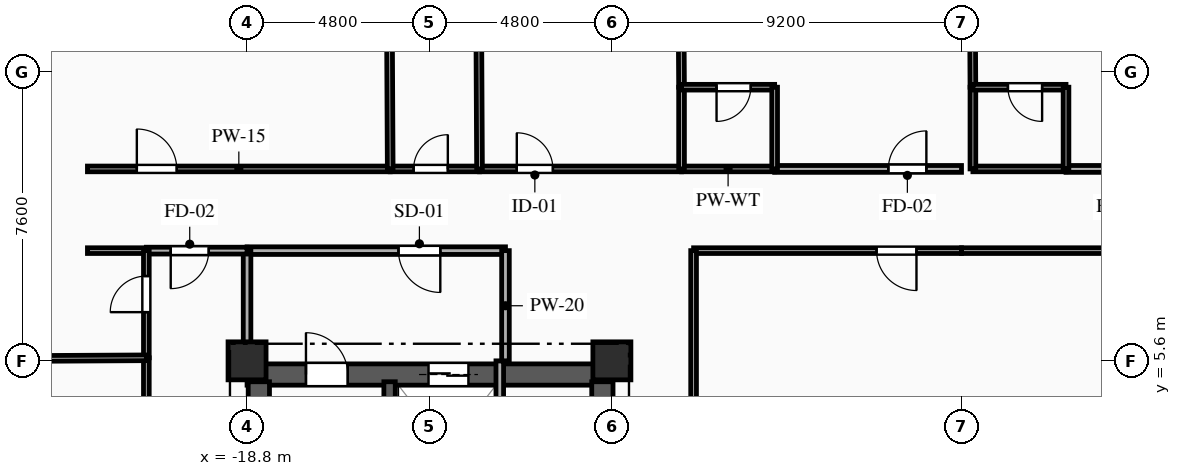
"""IFC4 building model, lengths in metres.
Left out: names, types, materials, properties, quantities, classifications, styles, units other than length and angle.
Written with IfcOpenShell. Run it as: python <this file> out.ifc"""

import sys

from ifc_helpers import new_model, si_unit, direction, frame, frame_2d, origin, origin_2d, place, context, subcontext, project, spatial, rectangle, extrude, element, fill, save


model = new_model("IFC4")
c1 = context("Model", 3, precision=1e-05, world=origin(), true_north=direction((0.0, 1.0)))
c2 = subcontext(c1, "Body", "Model", "MODEL_VIEW")
j1 = project(units=[si_unit("LENGTHUNIT", "METRE"), si_unit("PLANEANGLEUNIT", "RADIAN")], contexts=[c1])
p1 = place(None, origin())
s1 = spatial("IfcSite", under=j1, at=p1, CompositionType="ELEMENT")
p2 = place(p1, origin())
s2 = spatial("IfcBuilding", under=s1, at=p2, CompositionType="ELEMENT")
p3 = place(p2, frame((0.0, 0.0, 99.1)))
s3 = spatial("IfcBuildingStorey", under=s2, at=p3, CompositionType="ELEMENT", Elevation=99.1)
for number, where, z_axis, x_axis in (
    (1, (-18.8, 5.6, 0.0), (0.0, 0.0, 1.0), (1.0, 0.0, 0.0)),
    (2, (-9.2, 5.6, 0.0), (0.0, 0.0, 1.0), (1.0, 0.0, 0.0)),
):
    element("IfcColumn", number, at=place(p3, frame(where, z_axis=z_axis, x_axis=x_axis)), inside=s3, PredefinedType="COLUMN", context=c2, shape_type="SweptSolid", body=[
        extrude(rectangle(XDim=1.0, YDim=1.0, at=origin_2d()), origin(), (0.0, 0.0, 1.0), 3.35),
    ])
p4 = place(p3, frame((-18.8, 5.24, 0.0), z_axis=(0.0, 0.0, 1.0), x_axis=(1.0, 0.0, 0.0)))
e3 = element("IfcWall", 3, at=p4, inside=s3, PredefinedType="SHEAR", context=c2, shape_type="SweptSolid", body=[
    extrude(rectangle(XDim=9.6, YDim=0.56, at=frame_2d((4.8, 0.0))), origin(), (0.0, 0.0, 1.0), 3.045),
])
p5 = place(p4, frame((1.55, 0.0, 0.0)))
e4 = element("IfcOpeningElement", 4, at=p5, cuts=e3, PredefinedType="OPENING", context=c2, shape_type="SweptSolid", body=[
    extrude(rectangle(XDim=1.1, YDim=2.15, at=frame_2d((0.55, 1.075))), frame((0.0, 0.29, 0.0), z_axis=(0.0, -1.0, 0.0), x_axis=(1.0, 0.0, 0.0)), (0.0, 0.0, 1.0), 0.58),
])
p6 = place(p4, frame((4.775, 0.0, 0.0)))
e5 = element("IfcOpeningElement", 5, at=p6, cuts=e3, PredefinedType="OPENING", context=c2, shape_type="SweptSolid", body=[
    extrude(rectangle(XDim=1.05, YDim=2.1, at=frame_2d((0.525, 1.05))), frame((0.0, 0.29, 0.0), z_axis=(0.0, -1.0, 0.0), x_axis=(1.0, 0.0, 0.0)), (0.0, 0.0, 1.0), 0.58),
])
p7 = place(p3, frame((-18.49, -5.05, 0.0), z_axis=(0.0, 0.0, 1.0), x_axis=(0.0, 1.0, 0.0)))
e6 = element("IfcWall", 6, at=p7, inside=s3, PredefinedType="SHEAR", context=c2, shape_type="SweptSolid", body=[
    extrude(rectangle(XDim=10.1, YDim=0.56, at=frame_2d((5.05, 0.0))), origin(), (0.0, 0.0, 1.0), 3.045),
])
p8 = place(p3, frame((-9.45, -5.05, 0.0), z_axis=(0.0, 0.0, 1.0), x_axis=(0.0, 1.0, 0.0)))
e7 = element("IfcWall", 7, at=p8, inside=s3, PredefinedType="SHEAR", context=c2, shape_type="SweptSolid", body=[
    extrude(rectangle(XDim=10.1, YDim=0.56, at=frame_2d((5.05, 0.0))), origin(), (0.0, 0.0, 1.0), 3.045),
])
p9 = place(p8, frame((7.15, 0.0, 0.0)))
e8 = element("IfcOpeningElement", 8, at=p9, cuts=e7, PredefinedType="OPENING", context=c2, shape_type="SweptSolid", body=[
    extrude(rectangle(XDim=0.9, YDim=2.1, at=frame_2d((0.45, 1.05))), frame((0.0, 0.29, 0.0), z_axis=(0.0, -1.0, 0.0), x_axis=(1.0, 0.0, 0.0)), (0.0, 0.0, 1.0), 0.58),
])
p10 = place(p8, frame((2.4, 0.0, 0.0)))
e9 = element("IfcOpeningElement", 9, at=p10, cuts=e7, PredefinedType="OPENING", context=c2, shape_type="SweptSolid", body=[
    extrude(rectangle(XDim=1.2, YDim=2.15, at=frame_2d((0.6, 1.075))), frame((0.0, 0.29, 0.0), z_axis=(0.0, -1.0, 0.0), x_axis=(1.0, 0.0, 0.0)), (0.0, 0.0, 1.0), 0.58),
])
p11 = place(p3, frame((-15.05, -5.05, 0.0), z_axis=(0.0, 0.0, 1.0), x_axis=(0.0, 1.0, 0.0)))
e10 = element("IfcWall", 10, at=p11, inside=s3, PredefinedType="SHEAR", context=c2, shape_type="SweptSolid", body=[
    extrude(rectangle(XDim=10.1, YDim=0.3, at=frame_2d((5.05, 0.0))), origin(), (0.0, 0.0, 1.0), 3.045),
])
p12 = place(p3, frame((-12.15, 1.55, 0.0), z_axis=(0.0, 0.0, 1.0), x_axis=(0.0, 1.0, 0.0)))
e11 = element("IfcWall", 11, at=p12, inside=s3, PredefinedType="PARTITIONING", context=c2, shape_type="SweptSolid", body=[
    extrude(rectangle(XDim=4.05, YDim=0.2, at=frame_2d((2.025, 0.0))), origin(), (0.0, 0.0, 1.0), 3.045),
])
p13 = place(p3, frame((-12.0, 8.5, 0.0), z_axis=(0.0, 0.0, 1.0), x_axis=(-1.0, 0.0, 0.0)))
e12 = element("IfcWall", 12, at=p13, inside=s3, PredefinedType="PARTITIONING", context=c2, shape_type="SweptSolid", body=[
    extrude(rectangle(XDim=6.8, YDim=0.2, at=frame_2d((3.4, 0.0))), origin(), (0.0, 0.0, 1.0), 3.045),
])
p14 = place(p13, frame((1.715, 0.0, 0.0)))
e13 = element("IfcOpeningElement", 13, at=p14, cuts=e12, PredefinedType="OPENING", context=c2, shape_type="SweptSolid", body=[
    extrude(rectangle(XDim=1.1, YDim=2.15, at=frame_2d((0.55, 1.075))), frame((0.0, 0.11, 0.0), z_axis=(0.0, -1.0, 0.0), x_axis=(1.0, 0.0, 0.0)), (0.0, 0.0, 1.0), 0.22),
])
p15 = place(p3, frame((-12.0, 5.6, 0.0), z_axis=(0.0, 0.0, 1.0), x_axis=(0.0, 1.0, 0.0)))
e14 = element("IfcWall", 14, at=p15, inside=s3, PredefinedType="PARTITIONING", context=c2, shape_type="SweptSolid", body=[
    extrude(rectangle(XDim=2.9, YDim=0.2, at=frame_2d((1.45, 0.0))), origin(), (0.0, 0.0, 1.0), 3.045),
])
p16 = place(p3, frame((-18.8, 8.5, 0.0), z_axis=(0.0, 0.0, 1.0), x_axis=(0.0, -1.0, 0.0)))
e15 = element("IfcWall", 15, at=p16, inside=s3, PredefinedType="PARTITIONING", context=c2, shape_type="SweptSolid", body=[
    extrude(rectangle(XDim=2.9, YDim=0.2, at=frame_2d((1.45, 0.0))), origin(), (0.0, 0.0, 1.0), 2.53),
])
p17 = place(p3, frame((-18.8, 8.5, 0.0), z_axis=(0.0, 0.0, 1.0), x_axis=(-1.0, 0.0, 0.0)))
e16 = element("IfcWall", 16, at=p17, inside=s3, PredefinedType="PARTITIONING", context=c2, shape_type="SweptSolid", body=[
    extrude(rectangle(XDim=2.65, YDim=0.18, at=frame_2d((1.325, 0.0))), origin(), (0.0, 0.0, 1.0), 3.045),
])
p18 = place(p17, frame((1.009, 0.0, 0.0)))
e17 = element("IfcOpeningElement", 17, at=p18, cuts=e16, PredefinedType="OPENING", context=c2, shape_type="SweptSolid", body=[
    extrude(rectangle(XDim=1.0, YDim=2.15, at=frame_2d((0.5, 1.075))), frame((0.0, 0.1, 0.0), z_axis=(0.0, -1.0, 0.0), x_axis=(1.0, 0.0, 0.0)), (0.0, 0.0, 1.0), 0.2),
])
p19 = place(p3, frame((-21.45, 8.5, 0.0), z_axis=(0.0, 0.0, 1.0), x_axis=(-1.0, 0.0, 0.0)))
e18 = element("IfcWall", 18, at=p19, inside=s3, PredefinedType="PARTITIONING", context=c2, shape_type="SweptSolid", body=[
    extrude(rectangle(XDim=1.55, YDim=0.15, at=frame_2d((0.775, 0.0))), origin(), (0.0, 0.0, 1.0), 3.045),
])
p20 = place(p3, frame((-23.0, 10.65, 0.0), z_axis=(0.0, 0.0, 1.0), x_axis=(1.0, 0.0, 0.0)))
e19 = element("IfcWall", 19, at=p20, inside=s3, PredefinedType="PARTITIONING", context=c2, shape_type="SweptSolid", body=[
    extrude(rectangle(XDim=7.967, YDim=0.15, at=frame_2d((3.983, 0.0))), origin(), (0.0, 0.0, 1.0), 3.045),
])
p21 = place(p20, frame((1.3, 0.0, 0.0)))
e20 = element("IfcOpeningElement", 20, at=p21, cuts=e19, PredefinedType="OPENING", context=c2, shape_type="SweptSolid", body=[
    extrude(rectangle(XDim=1.05, YDim=2.15, at=frame_2d((0.525, 1.075))), frame((0.0, 0.085, 0.0), z_axis=(0.0, -1.0, 0.0), x_axis=(1.0, 0.0, 0.0)), (0.0, 0.0, 1.0), 0.17),
])
p22 = place(p3, frame((-15.033, 10.65, 0.0), z_axis=(0.0, 0.0, 1.0), x_axis=(1.0, 0.0, 0.0)))
e21 = element("IfcWall", 21, at=p22, inside=s3, PredefinedType="PLUMBINGWALL", context=c2, shape_type="SweptSolid", body=[
    extrude(rectangle(XDim=2.35, YDim=0.15, at=frame_2d((1.175, 0.0))), origin(), (0.0, 0.0, 1.0), 3.045),
])
p23 = place(p22, frame((0.616, 0.0, 0.0)))
e22 = element("IfcOpeningElement", 22, at=p23, cuts=e21, PredefinedType="OPENING", context=c2, shape_type="SweptSolid", body=[
    extrude(rectangle(XDim=0.9, YDim=2.1, at=frame_2d((0.45, 1.05))), frame((0.0, 0.085, 0.0), z_axis=(0.0, -1.0, 0.0), x_axis=(1.0, 0.0, 0.0)), (0.0, 0.0, 1.0), 0.17),
])
p24 = place(p3, frame((-12.683, 10.65, 0.0), z_axis=(0.0, 0.0, 1.0), x_axis=(1.0, 0.0, 0.0)))
e23 = element("IfcWall", 23, at=p24, inside=s3, PredefinedType="PARTITIONING", context=c2, shape_type="SweptSolid", body=[
    extrude(rectangle(XDim=5.316, YDim=0.15, at=frame_2d((2.658, 0.0))), origin(), (0.0, 0.0, 1.0), 3.045),
])
p25 = place(p24, frame((0.981, 0.0, 0.0)))
e24 = element("IfcOpeningElement", 24, at=p25, cuts=e23, PredefinedType="OPENING", context=c2, shape_type="SweptSolid", body=[
    extrude(rectangle(XDim=0.95, YDim=2.1, at=frame_2d((0.475, 1.05))), frame((0.0, 0.085, 0.0), z_axis=(0.0, -1.0, 0.0), x_axis=(1.0, 0.0, 0.0)), (0.0, 0.0, 1.0), 0.17),
])
p26 = place(p3, frame((-4.917, 10.65, 0.0), z_axis=(0.0, 0.0, 1.0), x_axis=(1.0, 0.0, 0.0)))
e25 = element("IfcWall", 25, at=p26, inside=s3, PredefinedType="PARTITIONING", context=c2, shape_type="SweptSolid", body=[
    extrude(rectangle(XDim=4.917, YDim=0.18, at=frame_2d((2.458, 0.0))), origin(), (0.0, 0.0, 1.0), 3.045),
])
p27 = place(p26, frame((2.992, 0.0, 0.0)))
e26 = element("IfcOpeningElement", 26, at=p27, cuts=e25, PredefinedType="OPENING", context=c2, shape_type="SweptSolid", body=[
    extrude(rectangle(XDim=1.0, YDim=2.15, at=frame_2d((0.5, 1.075))), frame((0.0, 0.1, 0.0), z_axis=(0.0, -1.0, 0.0), x_axis=(1.0, 0.0, 0.0)), (0.0, 0.0, 1.0), 0.2),
])
p28 = place(p3, frame((-7.367, 10.65, 0.0), z_axis=(0.0, 0.0, 1.0), x_axis=(1.0, 0.0, 0.0)))
e27 = element("IfcWall", 27, at=p28, inside=s3, PredefinedType="PLUMBINGWALL", context=c2, shape_type="SweptSolid", body=[
    extrude(rectangle(XDim=2.45, YDim=0.15, at=frame_2d((1.225, 0.0))), origin(), (0.0, 0.0, 1.0), 3.045),
])
p29 = place(p3, frame((0.0, 8.5, 0.0), z_axis=(0.0, 0.0, 1.0), x_axis=(-1.0, 0.0, 0.0)))
e28 = element("IfcWall", 28, at=p29, inside=s3, PredefinedType="PARTITIONING", context=c2, shape_type="SweptSolid", body=[
    extrude(rectangle(XDim=7.05, YDim=0.15, at=frame_2d((3.525, 0.0))), origin(), (0.0, 0.0, 1.0), 3.045),
])
p30 = place(p29, frame((1.185, 0.0, 0.0)))
e29 = element("IfcOpeningElement", 29, at=p30, cuts=e28, PredefinedType="OPENING", context=c2, shape_type="SweptSolid", body=[
    extrude(rectangle(XDim=1.05, YDim=2.15, at=frame_2d((0.525, 1.075))), frame((0.0, 0.085, 0.0), z_axis=(0.0, -1.0, 0.0), x_axis=(1.0, 0.0, 0.0)), (0.0, 0.0, 1.0), 0.17),
])
p31 = place(p3, frame((2.75, 10.65, 0.0), z_axis=(0.0, 0.0, 1.0), x_axis=(1.0, 0.0, 0.0)))
e30 = element("IfcWall", 30, at=p31, inside=s3, PredefinedType="PARTITIONING", context=c2, shape_type="SweptSolid", body=[
    extrude(rectangle(XDim=5.217, YDim=0.18, at=frame_2d((2.608, 0.0))), origin(), (0.0, 0.0, 1.0), 3.045),
])
p32 = place(p31, frame((0.962, 0.0, 0.0)))
e31 = element("IfcOpeningElement", 31, at=p32, cuts=e30, PredefinedType="OPENING", context=c2, shape_type="SweptSolid", body=[
    extrude(rectangle(XDim=1.0, YDim=2.15, at=frame_2d((0.5, 1.075))), frame((0.0, 0.1, 0.0), z_axis=(0.0, -1.0, 0.0), x_axis=(1.0, 0.0, 0.0)), (0.0, 0.0, 1.0), 0.2),
])
p33 = place(p3, frame((0.3, 10.65, 0.0), z_axis=(0.0, 0.0, 1.0), x_axis=(1.0, 0.0, 0.0)))
e32 = element("IfcWall", 32, at=p33, inside=s3, PredefinedType="PLUMBINGWALL", context=c2, shape_type="SweptSolid", body=[
    extrude(rectangle(XDim=2.45, YDim=0.15, at=frame_2d((1.225, 0.0))), origin(), (0.0, 0.0, 1.0), 3.045),
])
for number, where, z_axis, x_axis in (
    (33, (7.05, 8.5, 0.0), (0.0, 0.0, 1.0), (-1.0, 0.0, 0.0)),
    (34, (-7.05, 8.5, 0.0), (0.0, 0.0, 1.0), (0.0, -1.0, 0.0)),
):
    element("IfcWall", number, at=place(p3, frame(where, z_axis=z_axis, x_axis=x_axis)), inside=s3, PredefinedType="PARTITIONING", context=c2, shape_type="SweptSolid", body=[
        extrude(rectangle(XDim=7.05, YDim=0.15, at=frame_2d((3.525, 0.0))), origin(), (0.0, 0.0, 1.0), 3.045),
    ])
p34 = place(p3, frame((-21.45, 2.86, 0.0), z_axis=(0.0, 0.0, 1.0), x_axis=(0.0, 1.0, 0.0)))
e35 = element("IfcWall", 35, at=p34, inside=s3, PredefinedType="PARTITIONING", context=c2, shape_type="SweptSolid", body=[
    extrude(rectangle(XDim=2.82, YDim=0.15, at=frame_2d((1.41, 0.0))), origin(), (0.0, 0.0, 1.0), 3.045),
])
p35 = place(p34, frame((0.669, 0.0, 0.0)))
e36 = element("IfcOpeningElement", 36, at=p35, cuts=e35, PredefinedType="OPENING", context=c2, shape_type="SweptSolid", body=[
    extrude(rectangle(XDim=0.95, YDim=2.1, at=frame_2d((0.475, 1.05))), frame((0.0, 0.085, 0.0), z_axis=(0.0, -1.0, 0.0), x_axis=(1.0, 0.0, 0.0)), (0.0, 0.0, 1.0), 0.17),
])
p36 = place(p3, frame((-21.45, 5.68, 0.0), z_axis=(0.0, 0.0, 1.0), x_axis=(0.0, 1.0, 0.0)))
e37 = element("IfcWall", 37, at=p36, inside=s3, PredefinedType="PARTITIONING", context=c2, shape_type="SweptSolid", body=[
    extrude(rectangle(XDim=2.82, YDim=0.15, at=frame_2d((1.41, 0.0))), origin(), (0.0, 0.0, 1.0), 3.045),
])
p37 = place(p36, frame((1.201, 0.0, 0.0)))
e38 = element("IfcOpeningElement", 38, at=p37, cuts=e37, PredefinedType="OPENING", context=c2, shape_type="SweptSolid", body=[
    extrude(rectangle(XDim=0.95, YDim=2.1, at=frame_2d((0.475, 1.05))), frame((0.0, 0.085, 0.0), z_axis=(0.0, -1.0, 0.0), x_axis=(1.0, 0.0, 0.0)), (0.0, 0.0, 1.0), 0.17),
])
p38 = place(p3, frame((-29.27, 5.636, 0.0), z_axis=(0.0, 0.0, 1.0), x_axis=(0.999984210669, 0.005619467326, 0.0)))
e39 = element("IfcWall", 39, at=p38, inside=s3, PredefinedType="PARTITIONING", context=c2, shape_type="SweptSolid", body=[
    extrude(rectangle(XDim=7.82, YDim=0.15, at=frame_2d((3.91, 0.0))), origin(), (0.0, 0.0, 1.0), 3.045),
])
p39 = place(p3, frame((-15.077, 18.85, 0.0), z_axis=(0.0, 0.0, 1.0), x_axis=(0.005358979853, -0.999985640564, 0.0)))
e40 = element("IfcWall", 40, at=p39, inside=s3, PredefinedType="PLUMBINGWALL", context=c2, shape_type="SweptSolid", body=[
    extrude(rectangle(XDim=8.2, YDim=0.15, at=frame_2d((4.1, 0.0))), origin(), (0.0, 0.0, 1.0), 3.045),
])
p40 = place(p3, frame((-12.727, 19.097, 0.0), z_axis=(0.0, 0.0, 1.0), x_axis=(0.005173341175, -0.999986618181, 0.0)))
e41 = element("IfcWall", 41, at=p40, inside=s3, PredefinedType="PLUMBINGWALL", context=c2, shape_type="SweptSolid", body=[
    extrude(rectangle(XDim=8.447, YDim=0.15, at=frame_2d((4.224, 0.0))), origin(), (0.0, 0.0, 1.0), 3.045),
])
p41 = place(p3, frame((-7.411, 19.656, 0.0), z_axis=(0.0, 0.0, 1.0), x_axis=(0.006409668201, -0.999979457866, 0.0)))
e42 = element("IfcWall", 42, at=p41, inside=s3, PredefinedType="PARTITIONING", context=c2, shape_type="SweptSolid", body=[
    extrude(rectangle(XDim=6.856, YDim=0.15, at=frame_2d((3.428, 0.0))), origin(), (0.0, 0.0, 1.0), 3.045),
])
p42 = place(p3, frame((-7.367, 12.8, 0.0), z_axis=(0.0, 0.0, 1.0), x_axis=(0.0, -1.0, 0.0)))
e43 = element("IfcWall", 43, at=p42, inside=s3, PredefinedType="PLUMBINGWALL", context=c2, shape_type="SweptSolid", body=[
    extrude(rectangle(XDim=2.15, YDim=0.15, at=frame_2d((1.075, 0.0))), origin(), (0.0, 0.0, 1.0), 3.045),
])
p43 = place(p3, frame((-4.917, 12.8, 0.0), z_axis=(0.0, 0.0, 1.0), x_axis=(-1.0, 0.0, 0.0)))
e44 = element("IfcWall", 44, at=p43, inside=s3, PredefinedType="PLUMBINGWALL", context=c2, shape_type="SweptSolid", body=[
    extrude(rectangle(XDim=2.45, YDim=0.15, at=frame_2d((1.225, 0.0))), origin(), (0.0, 0.0, 1.0), 3.045),
])
p44 = place(p43, frame((0.629, 0.0, 0.0)))
e45 = element("IfcOpeningElement", 45, at=p44, cuts=e44, PredefinedType="OPENING", context=c2, shape_type="SweptSolid", body=[
    extrude(rectangle(XDim=0.9, YDim=2.1, at=frame_2d((0.45, 1.05))), frame((0.0, 0.085, 0.0), z_axis=(0.0, -1.0, 0.0), x_axis=(1.0, 0.0, 0.0)), (0.0, 0.0, 1.0), 0.17),
])
p45 = place(p3, frame((-4.917, 10.65, 0.0), z_axis=(0.0, 0.0, 1.0), x_axis=(0.0, 1.0, 0.0)))
e46 = element("IfcWall", 46, at=p45, inside=s3, PredefinedType="PLUMBINGWALL", context=c2, shape_type="SweptSolid", body=[
    extrude(rectangle(XDim=2.15, YDim=0.15, at=frame_2d((1.075, 0.0))), origin(), (0.0, 0.0, 1.0), 3.045),
])
p46 = place(p3, frame((0.256, 20.462, 0.0), z_axis=(0.0, 0.0, 1.0), x_axis=(0.00573567775, -0.999983550865, 0.0)))
e47 = element("IfcWall", 47, at=p46, inside=s3, PredefinedType="PARTITIONING", context=c2, shape_type="SweptSolid", body=[
    extrude(rectangle(XDim=7.662, YDim=0.15, at=frame_2d((3.831, 0.0))), origin(), (0.0, 0.0, 1.0), 3.045),
])
p47 = place(p3, frame((0.3, 12.8, 0.0), z_axis=(0.0, 0.0, 1.0), x_axis=(0.0, -1.0, 0.0)))
e48 = element("IfcWall", 48, at=p47, inside=s3, PredefinedType="PLUMBINGWALL", context=c2, shape_type="SweptSolid", body=[
    extrude(rectangle(XDim=2.15, YDim=0.15, at=frame_2d((1.075, 0.0))), origin(), (0.0, 0.0, 1.0), 3.045),
])
p48 = place(p3, frame((2.75, 12.8, 0.0), z_axis=(0.0, 0.0, 1.0), x_axis=(-1.0, 0.0, 0.0)))
e49 = element("IfcWall", 49, at=p48, inside=s3, PredefinedType="PLUMBINGWALL", context=c2, shape_type="SweptSolid", body=[
    extrude(rectangle(XDim=2.45, YDim=0.15, at=frame_2d((1.225, 0.0))), origin(), (0.0, 0.0, 1.0), 3.045),
])
p49 = place(p48, frame((0.629, 0.0, 0.0)))
e50 = element("IfcOpeningElement", 50, at=p49, cuts=e49, PredefinedType="OPENING", context=c2, shape_type="SweptSolid", body=[
    extrude(rectangle(XDim=0.9, YDim=2.1, at=frame_2d((0.45, 1.05))), frame((0.0, 0.085, 0.0), z_axis=(0.0, -1.0, 0.0), x_axis=(1.0, 0.0, 0.0)), (0.0, 0.0, 1.0), 0.17),
])
p50 = place(p3, frame((2.75, 10.65, 0.0), z_axis=(0.0, 0.0, 1.0), x_axis=(0.0, 1.0, 0.0)))
e51 = element("IfcWall", 51, at=p50, inside=s3, PredefinedType="PLUMBINGWALL", context=c2, shape_type="SweptSolid", body=[
    extrude(rectangle(XDim=2.15, YDim=0.15, at=frame_2d((1.075, 0.0))), origin(), (0.0, 0.0, 1.0), 3.045),
])
p51 = place(p5, origin())
e52 = element("IfcDoor", 52, at=p51, inside=s3, OperationType="SINGLE_SWING_LEFT", PredefinedType="DOOR", context=c2, shape_type="SweptSolid", body=[
    extrude(rectangle(XDim=1.1, YDim=2.15, at=frame_2d((0.55, 1.075))), frame((0.0, 0.025, 0.0), z_axis=(0.0, -1.0, 0.0), x_axis=(1.0, 0.0, 0.0)), (0.0, 0.0, 1.0), 0.05),
])
fill(e4, e52)
p52 = place(p6, origin())
e53 = element("IfcDoor", 53, at=p52, inside=s3, OperationType="DOUBLE_DOOR_SLIDING", PredefinedType="DOOR", context=c2, shape_type="SweptSolid", body=[
    extrude(rectangle(XDim=1.05, YDim=2.1, at=frame_2d((0.525, 1.05))), frame((0.0, 0.025, 0.0), z_axis=(0.0, -1.0, 0.0), x_axis=(1.0, 0.0, 0.0)), (0.0, 0.0, 1.0), 0.05),
])
fill(e5, e53)
p53 = place(p14, origin())
e54 = element("IfcDoor", 54, at=p53, inside=s3, OperationType="SINGLE_SWING_LEFT", PredefinedType="DOOR", context=c2, shape_type="SweptSolid", body=[
    extrude(rectangle(XDim=1.1, YDim=2.15, at=frame_2d((0.55, 1.075))), frame((0.0, 0.025, 0.0), z_axis=(0.0, -1.0, 0.0), x_axis=(1.0, 0.0, 0.0)), (0.0, 0.0, 1.0), 0.05),
])
fill(e13, e54)
p54 = place(p18, origin())
e55 = element("IfcDoor", 55, at=p54, inside=s3, OperationType="SINGLE_SWING_RIGHT", PredefinedType="DOOR", context=c2, shape_type="SweptSolid", body=[
    extrude(rectangle(XDim=1.0, YDim=2.15, at=frame_2d((0.5, 1.075))), frame((0.0, 0.025, 0.0), z_axis=(0.0, -1.0, 0.0), x_axis=(1.0, 0.0, 0.0)), (0.0, 0.0, 1.0), 0.05),
])
fill(e17, e55)
p55 = place(p21, origin())
e56 = element("IfcDoor", 56, at=p55, inside=s3, OperationType="SINGLE_SWING_LEFT", PredefinedType="DOOR", context=c2, shape_type="SweptSolid", body=[
    extrude(rectangle(XDim=1.05, YDim=2.15, at=frame_2d((0.525, 1.075))), frame((0.0, 0.025, 0.0), z_axis=(0.0, -1.0, 0.0), x_axis=(1.0, 0.0, 0.0)), (0.0, 0.0, 1.0), 0.05),
])
fill(e20, e56)
p56 = place(p23, origin())
e57 = element("IfcDoor", 57, at=p56, inside=s3, OperationType="SINGLE_SWING_RIGHT", PredefinedType="DOOR", context=c2, shape_type="SweptSolid", body=[
    extrude(rectangle(XDim=0.9, YDim=2.1, at=frame_2d((0.45, 1.05))), frame((0.0, 0.025, 0.0), z_axis=(0.0, -1.0, 0.0), x_axis=(1.0, 0.0, 0.0)), (0.0, 0.0, 1.0), 0.05),
])
fill(e22, e57)
p57 = place(p25, origin())
e58 = element("IfcDoor", 58, at=p57, inside=s3, OperationType="SINGLE_SWING_LEFT", PredefinedType="DOOR", context=c2, shape_type="SweptSolid", body=[
    extrude(rectangle(XDim=0.95, YDim=2.1, at=frame_2d((0.475, 1.05))), frame((0.0, 0.025, 0.0), z_axis=(0.0, -1.0, 0.0), x_axis=(1.0, 0.0, 0.0)), (0.0, 0.0, 1.0), 0.05),
])
fill(e24, e58)
p58 = place(p27, origin())
e59 = element("IfcDoor", 59, at=p58, inside=s3, OperationType="SINGLE_SWING_RIGHT", PredefinedType="DOOR", context=c2, shape_type="SweptSolid", body=[
    extrude(rectangle(XDim=1.0, YDim=2.15, at=frame_2d((0.5, 1.075))), frame((0.0, 0.025, 0.0), z_axis=(0.0, -1.0, 0.0), x_axis=(1.0, 0.0, 0.0)), (0.0, 0.0, 1.0), 0.05),
])
fill(e26, e59)
p59 = place(p30, origin())
e60 = element("IfcDoor", 60, at=p59, inside=s3, OperationType="SINGLE_SWING_LEFT", PredefinedType="DOOR", context=c2, shape_type="SweptSolid", body=[
    extrude(rectangle(XDim=1.05, YDim=2.15, at=frame_2d((0.525, 1.075))), frame((0.0, 0.025, 0.0), z_axis=(0.0, -1.0, 0.0), x_axis=(1.0, 0.0, 0.0)), (0.0, 0.0, 1.0), 0.05),
])
fill(e29, e60)
p60 = place(p37, origin())
e61 = element("IfcDoor", 61, at=p60, inside=s3, OperationType="SINGLE_SWING_LEFT", PredefinedType="DOOR", context=c2, shape_type="SweptSolid", body=[
    extrude(rectangle(XDim=0.95, YDim=2.1, at=frame_2d((0.475, 1.05))), frame((0.0, 0.025, 0.0), z_axis=(0.0, -1.0, 0.0), x_axis=(1.0, 0.0, 0.0)), (0.0, 0.0, 1.0), 0.05),
])
fill(e38, e61)
p61 = place(p44, origin())
e62 = element("IfcDoor", 62, at=p61, inside=s3, OperationType="SINGLE_SWING_RIGHT", PredefinedType="DOOR", context=c2, shape_type="SweptSolid", body=[
    extrude(rectangle(XDim=0.9, YDim=2.1, at=frame_2d((0.45, 1.05))), frame((0.0, 0.025, 0.0), z_axis=(0.0, -1.0, 0.0), x_axis=(1.0, 0.0, 0.0)), (0.0, 0.0, 1.0), 0.05),
])
fill(e45, e62)
p62 = place(p49, origin())
e63 = element("IfcDoor", 63, at=p62, inside=s3, OperationType="SINGLE_SWING_LEFT", PredefinedType="DOOR", context=c2, shape_type="SweptSolid", body=[
    extrude(rectangle(XDim=0.9, YDim=2.1, at=frame_2d((0.45, 1.05))), frame((0.0, 0.025, 0.0), z_axis=(0.0, -1.0, 0.0), x_axis=(1.0, 0.0, 0.0)), (0.0, 0.0, 1.0), 0.05),
])
fill(e50, e63)
save(model, sys.argv[1])
